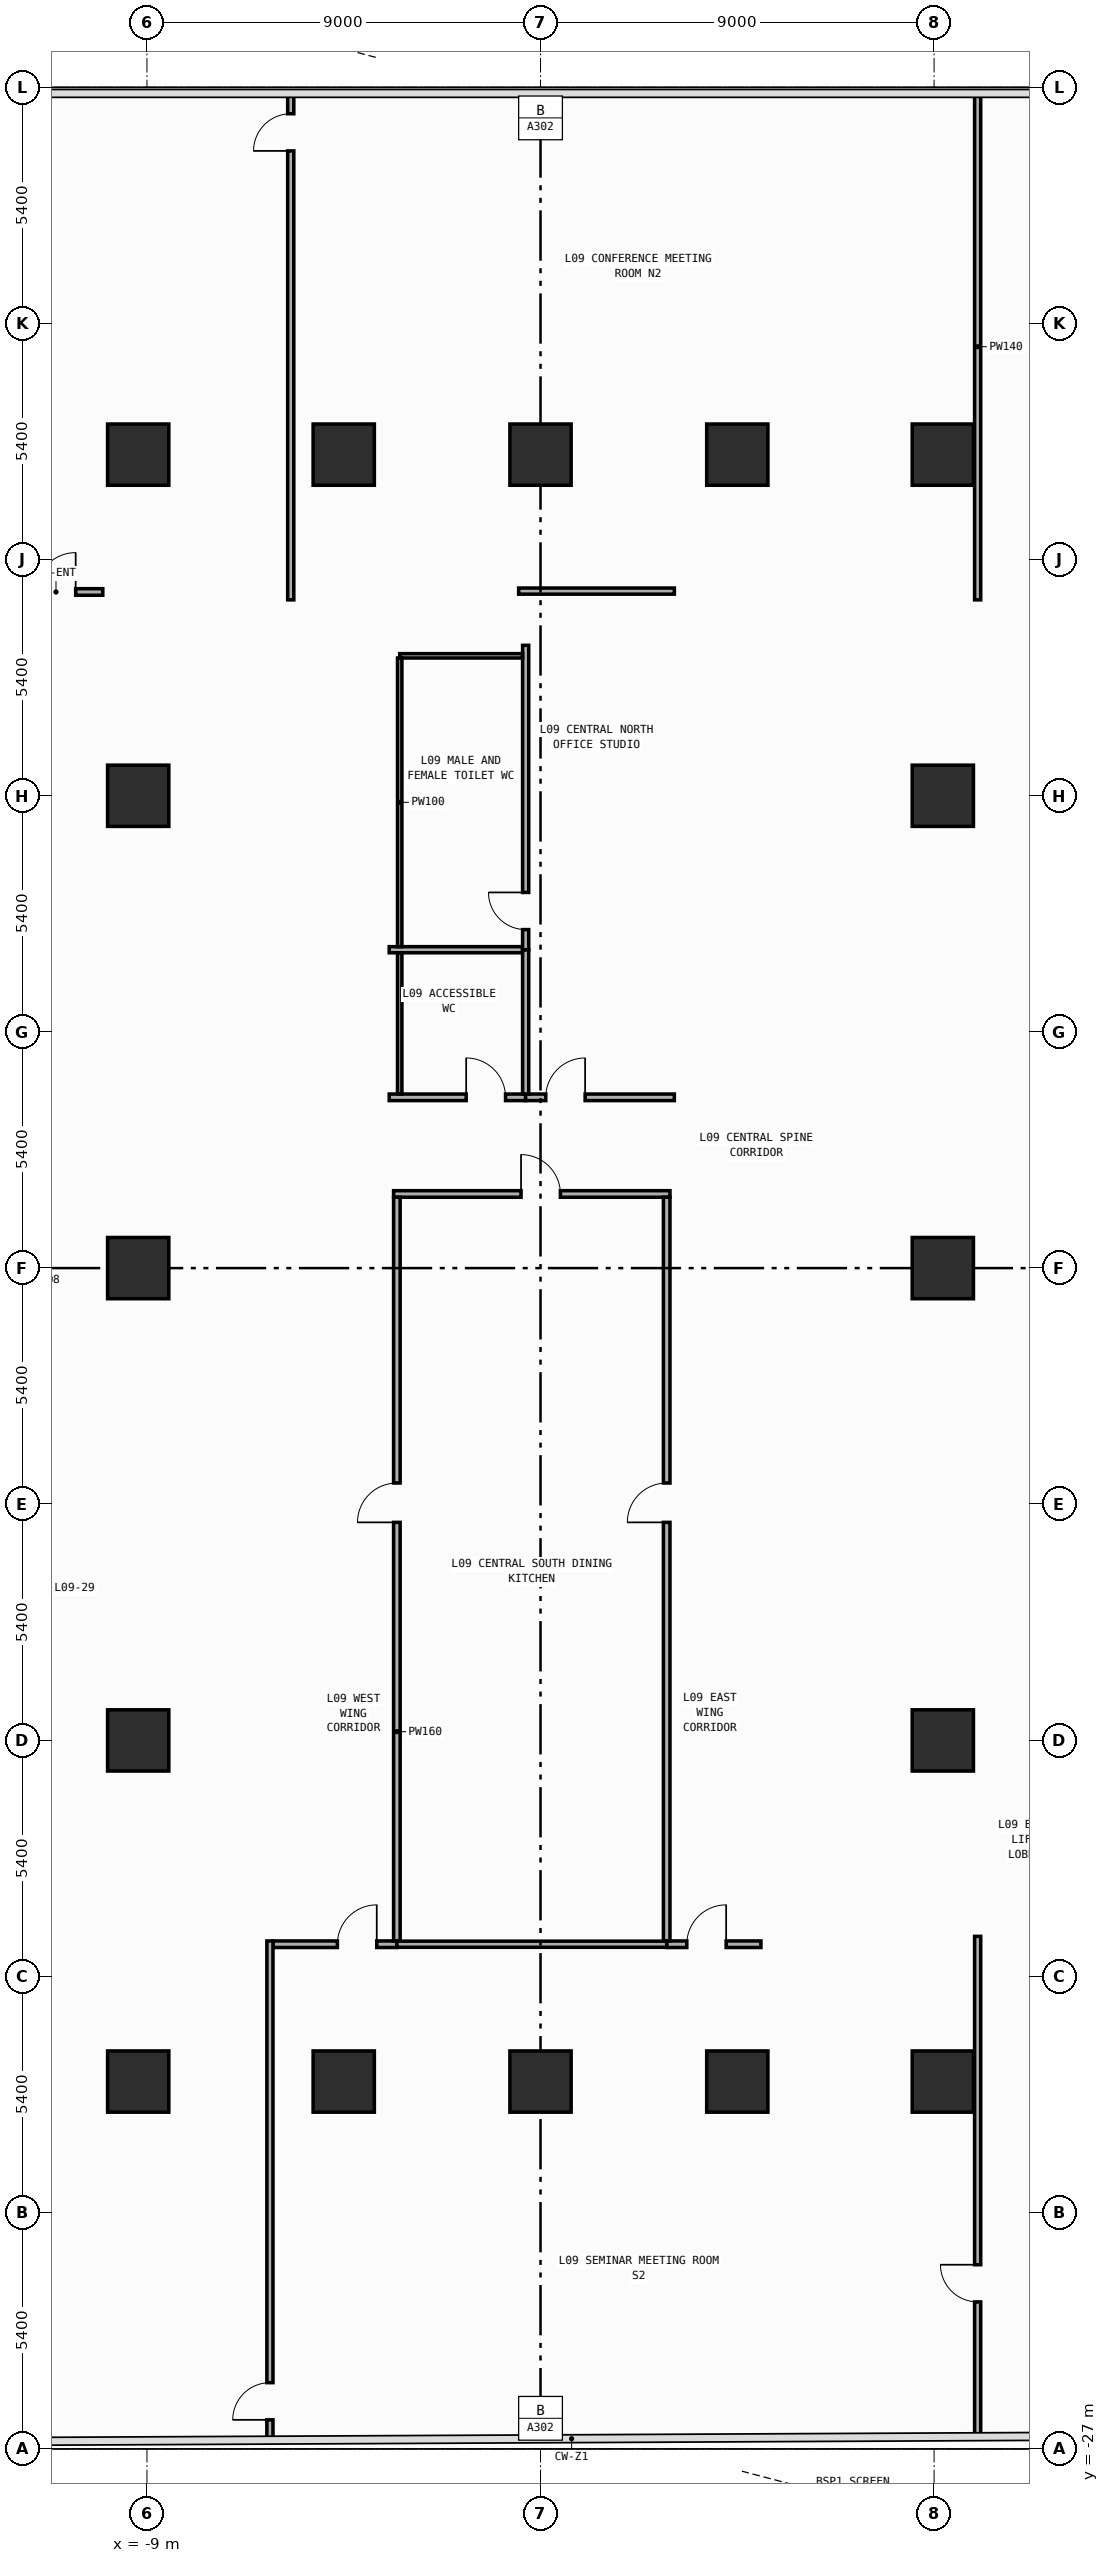
"""IFC4 building model, lengths in metres.
Left out: names, types, materials, properties, quantities, classifications, styles, units other than length and angle.
Written with IfcOpenShell. Run it as: python <this file> out.ifc"""

import sys

from ifc_helpers import new_model, si_unit, direction, frame, frame_2d, origin, origin_2d, place, context, subcontext, project, spatial, rectangle, extrude, element, fill, save


model = new_model("IFC4")
c1 = context("Model", 3, precision=1e-05, world=origin(), true_north=direction((0.0, 1.0)))
c2 = subcontext(c1, "Body", "Model", "MODEL_VIEW")
j1 = project(units=[si_unit("LENGTHUNIT", "METRE"), si_unit("PLANEANGLEUNIT", "RADIAN")], contexts=[c1])
p1 = place(None, origin())
s1 = spatial("IfcSite", under=j1, at=p1, CompositionType="ELEMENT")
p2 = place(p1, origin())
s2 = spatial("IfcBuilding", under=s1, at=p2, CompositionType="ELEMENT")
p3 = place(p2, frame((0.0, 0.0, 38.6)))
s3 = spatial("IfcBuildingStorey", under=s2, at=p3, CompositionType="ELEMENT", Elevation=38.6)
for number, where, z_axis, x_axis in (
    (1, (-9.2, -18.6, 0.0), (0.0, 0.0, 1.0), (1.0, 0.0, 0.0)),
    (2, (-9.2, -10.8, 0.0), (0.0, 0.0, 1.0), (1.0, 0.0, 0.0)),
    (3, (-9.2, 0.0, 0.0), (0.0, 0.0, 1.0), (1.0, 0.0, 0.0)),
    (4, (-9.2, 10.8, 0.0), (0.0, 0.0, 1.0), (1.0, 0.0, 0.0)),
    (5, (-9.2, 18.6, 0.0), (0.0, 0.0, 1.0), (1.0, 0.0, 0.0)),
    (6, (9.2, -18.6, 0.0), (0.0, 0.0, 1.0), (1.0, 0.0, 0.0)),
    (7, (9.2, -10.8, 0.0), (0.0, 0.0, 1.0), (1.0, 0.0, 0.0)),
    (8, (9.2, 0.0, 0.0), (0.0, 0.0, 1.0), (1.0, 0.0, 0.0)),
    (9, (9.2, 10.8, 0.0), (0.0, 0.0, 1.0), (1.0, 0.0, 0.0)),
    (10, (9.2, 18.6, 0.0), (0.0, 0.0, 1.0), (1.0, 0.0, 0.0)),
    (11, (-4.5, -18.6, 0.0), (0.0, 0.0, 1.0), (1.0, 0.0, 0.0)),
    (12, (0.0, -18.6, 0.0), (0.0, 0.0, 1.0), (1.0, 0.0, 0.0)),
    (13, (4.5, -18.6, 0.0), (0.0, 0.0, 1.0), (1.0, 0.0, 0.0)),
    (14, (-4.5, 18.6, 0.0), (0.0, 0.0, 1.0), (1.0, 0.0, 0.0)),
    (15, (0.0, 18.6, 0.0), (0.0, 0.0, 1.0), (1.0, 0.0, 0.0)),
    (16, (4.5, 18.6, 0.0), (0.0, 0.0, 1.0), (1.0, 0.0, 0.0)),
):
    element("IfcColumn", number, at=place(p3, frame(where, z_axis=z_axis, x_axis=x_axis)), inside=s3, PredefinedType="COLUMN", context=c2, shape_type="SweptSolid", body=[
        extrude(rectangle(XDim=1.4, YDim=1.4, at=origin_2d()), origin(), (0.0, 0.0, 1.0), 4.2),
    ])
p4 = place(p3, frame((-11.99, 15.46, 0.0), z_axis=(0.0, 0.0, 1.0), x_axis=(1.0, 0.0, 0.0)))
e17 = element("IfcWall", 17, at=p4, inside=s3, PredefinedType="PARTITIONING", context=c2, shape_type="SweptSolid", body=[
    extrude(rectangle(XDim=1.98, YDim=0.15, at=frame_2d((0.99, 0.0))), origin(), (0.0, 0.0, 1.0), 3.94),
])
p5 = place(p4, frame((0.46, 0.0, 0.0)))
e18 = element("IfcOpeningElement", 18, at=p5, cuts=e17, PredefinedType="OPENING", context=c2, shape_type="SweptSolid", body=[
    extrude(rectangle(XDim=0.9, YDim=2.15, at=frame_2d((0.45, 1.075))), frame((0.0, 0.085, 0.0), z_axis=(0.0, -1.0, 0.0), x_axis=(1.0, 0.0, 0.0)), (0.0, 0.0, 1.0), 0.17),
])
p6 = place(p3, frame((-3.46, 3.905, 0.0), z_axis=(0.0, 0.0, 1.0), x_axis=(1.0, 0.0, 0.0)))
e19 = element("IfcWall", 19, at=p6, inside=s3, PredefinedType="PARTITIONING", context=c2, shape_type="SweptSolid", body=[
    extrude(rectangle(XDim=3.12, YDim=0.15, at=frame_2d((1.56, 0.0))), origin(), (0.0, 0.0, 1.0), 3.94),
])
p7 = place(p6, frame((1.76, 0.0, 0.0)))
e20 = element("IfcOpeningElement", 20, at=p7, cuts=e19, PredefinedType="OPENING", context=c2, shape_type="SweptSolid", body=[
    extrude(rectangle(XDim=0.9, YDim=2.15, at=frame_2d((0.45, 1.075))), frame((0.0, 0.085, 0.0), z_axis=(0.0, -1.0, 0.0), x_axis=(1.0, 0.0, 0.0)), (0.0, 0.0, 1.0), 0.17),
])
p8 = place(p3, frame((-0.34, 3.905, 0.0), z_axis=(0.0, 0.0, 1.0), x_axis=(1.0, 0.0, 0.0)))
e21 = element("IfcWall", 21, at=p8, inside=s3, PredefinedType="PARTITIONING", context=c2, shape_type="SweptSolid", body=[
    extrude(rectangle(XDim=3.4, YDim=0.15, at=frame_2d((1.7, 0.0))), origin(), (0.0, 0.0, 1.0), 3.94),
])
p9 = place(p8, frame((0.46, 0.0, 0.0)))
e22 = element("IfcOpeningElement", 22, at=p9, cuts=e21, PredefinedType="OPENING", context=c2, shape_type="SweptSolid", body=[
    extrude(rectangle(XDim=0.9, YDim=2.15, at=frame_2d((0.45, 1.075))), frame((0.0, 0.085, 0.0), z_axis=(0.0, -1.0, 0.0), x_axis=(1.0, 0.0, 0.0)), (0.0, 0.0, 1.0), 0.17),
])
p10 = place(p3, frame((-3.36, 1.695, 0.0), z_axis=(0.0, 0.0, 1.0), x_axis=(1.0, 0.0, 0.0)))
e23 = element("IfcWall", 23, at=p10, inside=s3, PredefinedType="PARTITIONING", context=c2, shape_type="SweptSolid", body=[
    extrude(rectangle(XDim=6.32, YDim=0.15, at=frame_2d((3.16, 0.0))), origin(), (0.0, 0.0, 1.0), 3.94),
])
p11 = place(p10, frame((2.915, 0.0, 0.0)))
e24 = element("IfcOpeningElement", 24, at=p11, cuts=e23, PredefinedType="OPENING", context=c2, shape_type="SweptSolid", body=[
    extrude(rectangle(XDim=0.9, YDim=2.15, at=frame_2d((0.45, 1.075))), frame((0.0, 0.085, 0.0), z_axis=(0.0, -1.0, 0.0), x_axis=(1.0, 0.0, 0.0)), (0.0, 0.0, 1.0), 0.17),
])
p12 = place(p3, frame((-6.118, -15.46, 0.0), z_axis=(0.0, 0.0, 1.0), x_axis=(1.0, 0.0, 0.0)))
e25 = element("IfcWall", 25, at=p12, inside=s3, PredefinedType="PARTITIONING", context=c2, shape_type="SweptSolid", body=[
    extrude(rectangle(XDim=2.833, YDim=0.15, at=frame_2d((1.417, 0.0))), origin(), (0.0, 0.0, 1.0), 3.94),
])
p13 = place(p12, frame((1.473, 0.0, 0.0)))
e26 = element("IfcOpeningElement", 26, at=p13, cuts=e25, PredefinedType="OPENING", context=c2, shape_type="SweptSolid", body=[
    extrude(rectangle(XDim=0.9, YDim=2.15, at=frame_2d((0.45, 1.075))), frame((0.0, 0.085, 0.0), z_axis=(0.0, -1.0, 0.0), x_axis=(1.0, 0.0, 0.0)), (0.0, 0.0, 1.0), 0.17),
])
p14 = place(p3, frame((-3.285, -15.385, 0.0), z_axis=(0.0, 0.0, 1.0), x_axis=(0.0, 1.0, 0.0)))
e27 = element("IfcWall", 27, at=p14, inside=s3, PredefinedType="PARTITIONING", context=c2, shape_type="SweptSolid", body=[
    extrude(rectangle(XDim=17.005, YDim=0.15, at=frame_2d((8.502, 0.0))), origin(), (0.0, 0.0, 1.0), 3.94),
])
p15 = place(p14, frame((9.571, 0.0, 0.0)))
e28 = element("IfcOpeningElement", 28, at=p15, cuts=e27, PredefinedType="OPENING", context=c2, shape_type="SweptSolid", body=[
    extrude(rectangle(XDim=0.9, YDim=2.15, at=frame_2d((0.45, 1.075))), frame((0.0, 0.085, 0.0), z_axis=(0.0, -1.0, 0.0), x_axis=(1.0, 0.0, 0.0)), (0.0, 0.0, 1.0), 0.17),
])
p16 = place(p3, frame((2.885, -15.46, 0.0), z_axis=(0.0, 0.0, 1.0), x_axis=(1.0, 0.0, 0.0)))
e29 = element("IfcWall", 29, at=p16, inside=s3, PredefinedType="PARTITIONING", context=c2, shape_type="SweptSolid", body=[
    extrude(rectangle(XDim=2.155, YDim=0.15, at=frame_2d((1.078, 0.0))), origin(), (0.0, 0.0, 1.0), 3.94),
])
p17 = place(p16, frame((0.46, 0.0, 0.0)))
e30 = element("IfcOpeningElement", 30, at=p17, cuts=e29, PredefinedType="OPENING", context=c2, shape_type="SweptSolid", body=[
    extrude(rectangle(XDim=0.9, YDim=2.15, at=frame_2d((0.45, 1.075))), frame((0.0, 0.085, 0.0), z_axis=(0.0, -1.0, 0.0), x_axis=(1.0, 0.0, 0.0)), (0.0, 0.0, 1.0), 0.17),
])
p18 = place(p3, frame((2.885, -15.385, 0.0), z_axis=(0.0, 0.0, 1.0), x_axis=(0.0, 1.0, 0.0)))
e31 = element("IfcWall", 31, at=p18, inside=s3, PredefinedType="PARTITIONING", context=c2, shape_type="SweptSolid", body=[
    extrude(rectangle(XDim=17.005, YDim=0.15, at=frame_2d((8.502, 0.0))), origin(), (0.0, 0.0, 1.0), 3.94),
])
p19 = place(p18, frame((9.571, 0.0, 0.0)))
e32 = element("IfcOpeningElement", 32, at=p19, cuts=e31, PredefinedType="OPENING", context=c2, shape_type="SweptSolid", body=[
    extrude(rectangle(XDim=0.9, YDim=2.15, at=frame_2d((0.45, 1.075))), frame((0.0, 0.085, 0.0), z_axis=(0.0, -1.0, 0.0), x_axis=(1.0, 0.0, 0.0)), (0.0, 0.0, 1.0), 0.17),
])
p20 = place(p3, frame((-5.712, 15.28, 0.0), z_axis=(0.0, 0.0, 1.0), x_axis=(0.0, 1.0, 0.0)))
e33 = element("IfcWall", 33, at=p20, inside=s3, PredefinedType="PARTITIONING", context=c2, shape_type="SweptSolid", body=[
    extrude(rectangle(XDim=11.575, YDim=0.14, at=frame_2d((5.788, 0.0))), origin(), (0.0, 0.0, 1.0), 3.94),
])
p21 = place(p20, frame((10.265, 0.0, 0.0)))
e34 = element("IfcOpeningElement", 34, at=p21, cuts=e33, PredefinedType="OPENING", context=c2, shape_type="SweptSolid", body=[
    extrude(rectangle(XDim=0.85, YDim=2.1, at=frame_2d((0.425, 1.05))), frame((0.0, 0.08, 0.0), z_axis=(0.0, -1.0, 0.0), x_axis=(1.0, 0.0, 0.0)), (0.0, 0.0, 1.0), 0.16),
])
p22 = place(p3, frame((9.996, 15.28, 0.0), z_axis=(0.0, 0.0, 1.0), x_axis=(0.0, 1.0, 0.0)))
e35 = element("IfcWall", 35, at=p22, inside=s3, PredefinedType="PARTITIONING", context=c2, shape_type="SweptSolid", body=[
    extrude(rectangle(XDim=11.575, YDim=0.14, at=frame_2d((5.788, 0.0))), origin(), (0.0, 0.0, 1.0), 3.94),
])
p23 = place(p3, frame((-0.5, 15.48, 0.0), z_axis=(0.0, 0.0, 1.0), x_axis=(1.0, 0.0, 0.0)))
e36 = element("IfcWall", 36, at=p23, inside=s3, PredefinedType="PARTITIONING", context=c2, shape_type="SweptSolid", body=[
    extrude(rectangle(XDim=3.56, YDim=0.14, at=frame_2d((1.78, 0.0))), origin(), (0.0, 0.0, 1.0), 3.94),
])
p24 = place(p3, frame((-6.188, -26.795, 0.0), z_axis=(0.0, 0.0, 1.0), x_axis=(0.0, 1.0, 0.0)))
e37 = element("IfcWall", 37, at=p24, inside=s3, PredefinedType="PARTITIONING", context=c2, shape_type="SweptSolid", body=[
    extrude(rectangle(XDim=11.41, YDim=0.14, at=frame_2d((5.705, 0.0))), origin(), (0.0, 0.0, 1.0), 3.94),
])
p25 = place(p24, frame((0.46, 0.0, 0.0)))
e38 = element("IfcOpeningElement", 38, at=p25, cuts=e37, PredefinedType="OPENING", context=c2, shape_type="SweptSolid", body=[
    extrude(rectangle(XDim=0.85, YDim=2.1, at=frame_2d((0.425, 1.05))), frame((0.0, 0.08, 0.0), z_axis=(0.0, -1.0, 0.0), x_axis=(1.0, 0.0, 0.0)), (0.0, 0.0, 1.0), 0.16),
])
p26 = place(p3, frame((9.996, -26.716, 0.0), z_axis=(0.0, 0.0, 1.0), x_axis=(0.0, 1.0, 0.0)))
e39 = element("IfcWall", 39, at=p26, inside=s3, PredefinedType="PARTITIONING", context=c2, shape_type="SweptSolid", body=[
    extrude(rectangle(XDim=11.436, YDim=0.14, at=frame_2d((5.718, 0.0))), origin(), (0.0, 0.0, 1.0), 3.94),
])
p27 = place(p26, frame((3.078, 0.0, 0.0)))
e40 = element("IfcOpeningElement", 40, at=p27, cuts=e39, PredefinedType="OPENING", context=c2, shape_type="SweptSolid", body=[
    extrude(rectangle(XDim=0.85, YDim=2.1, at=frame_2d((0.425, 1.05))), frame((0.0, 0.08, 0.0), z_axis=(0.0, -1.0, 0.0), x_axis=(1.0, 0.0, 0.0)), (0.0, 0.0, 1.0), 0.16),
])
p28 = place(p3, frame((-3.285, -15.46, 0.0), z_axis=(0.0, 0.0, 1.0), x_axis=(1.0, 0.0, 0.0)))
e41 = element("IfcWall", 41, at=p28, inside=s3, PredefinedType="PARTITIONING", context=c2, shape_type="SweptSolid", body=[
    extrude(rectangle(XDim=6.17, YDim=0.14, at=frame_2d((3.085, 0.0))), origin(), (0.0, 0.0, 1.0), 3.94),
])
p29 = place(p3, frame((-3.46, 7.28, 0.0), z_axis=(0.0, 0.0, 1.0), x_axis=(1.0, 0.0, 0.0)))
e42 = element("IfcWall", 42, at=p29, inside=s3, PredefinedType="PARTITIONING", context=c2, shape_type="SweptSolid", body=[
    extrude(rectangle(XDim=3.05, YDim=0.14, at=frame_2d((1.525, 0.0))), origin(), (0.0, 0.0, 1.0), 3.94),
])
p30 = place(p3, frame((-0.34, 3.98, 0.0), z_axis=(0.0, 0.0, 1.0), x_axis=(0.0, 1.0, 0.0)))
e43 = element("IfcWall", 43, at=p30, inside=s3, PredefinedType="PARTITIONING", context=c2, shape_type="SweptSolid", body=[
    extrude(rectangle(XDim=3.3, YDim=0.14, at=frame_2d((1.65, 0.0))), origin(), (0.0, 0.0, 1.0), 3.94),
])
p31 = place(p3, frame((-0.34, 7.28, 0.0), z_axis=(0.0, 0.0, 1.0), x_axis=(0.0, 1.0, 0.0)))
e44 = element("IfcWall", 44, at=p31, inside=s3, PredefinedType="PARTITIONING", context=c2, shape_type="SweptSolid", body=[
    extrude(rectangle(XDim=6.96, YDim=0.14, at=frame_2d((3.48, 0.0))), origin(), (0.0, 0.0, 1.0), 3.94),
])
p32 = place(p31, frame((0.46, 0.0, 0.0)))
e45 = element("IfcOpeningElement", 45, at=p32, cuts=e44, PredefinedType="OPENING", context=c2, shape_type="SweptSolid", body=[
    extrude(rectangle(XDim=0.85, YDim=2.1, at=frame_2d((0.425, 1.05))), frame((0.0, 0.08, 0.0), z_axis=(0.0, -1.0, 0.0), x_axis=(1.0, 0.0, 0.0)), (0.0, 0.0, 1.0), 0.16),
])
p33 = place(p3, frame((-3.22, 3.98, 0.0), z_axis=(0.0, 0.0, 1.0), x_axis=(0.0, 1.0, 0.0)))
e46 = element("IfcWall", 46, at=p33, inside=s3, PredefinedType="PARTITIONING", context=c2, shape_type="SweptSolid", body=[
    extrude(rectangle(XDim=3.23, YDim=0.1, at=frame_2d((1.615, 0.0))), origin(), (0.0, 0.0, 1.0), 3.94),
])
p34 = place(p3, frame((-3.22, 14.0, 0.0), z_axis=(0.0, 0.0, 1.0), x_axis=(1.0, 0.0, 0.0)))
e47 = element("IfcWall", 47, at=p34, inside=s3, PredefinedType="PARTITIONING", context=c2, shape_type="SweptSolid", body=[
    extrude(rectangle(XDim=2.81, YDim=0.1, at=frame_2d((1.405, 0.0))), origin(), (0.0, 0.0, 1.0), 3.94),
])
p35 = place(p3, frame((-3.22, 7.35, 0.0), z_axis=(0.0, 0.0, 1.0), x_axis=(0.0, 1.0, 0.0)))
e48 = element("IfcWall", 48, at=p35, inside=s3, PredefinedType="PARTITIONING", context=c2, shape_type="SweptSolid", body=[
    extrude(rectangle(XDim=6.6, YDim=0.1, at=frame_2d((3.3, 0.0))), origin(), (0.0, 0.0, 1.0), 3.94),
])
p36 = place(p5, origin())
e49 = element("IfcDoor", 49, at=p36, inside=s3, OperationType="SINGLE_SWING_RIGHT", PredefinedType="DOOR", context=c2, shape_type="SweptSolid", body=[
    extrude(rectangle(XDim=0.9, YDim=2.15, at=frame_2d((0.45, 1.075))), frame((0.0, 0.025, 0.0), z_axis=(0.0, -1.0, 0.0), x_axis=(1.0, 0.0, 0.0)), (0.0, 0.0, 1.0), 0.05),
])
fill(e18, e49)
p37 = place(p7, origin())
e50 = element("IfcDoor", 50, at=p37, inside=s3, OperationType="SINGLE_SWING_LEFT", PredefinedType="DOOR", context=c2, shape_type="SweptSolid", body=[
    extrude(rectangle(XDim=0.9, YDim=2.15, at=frame_2d((0.45, 1.075))), frame((0.0, 0.025, 0.0), z_axis=(0.0, -1.0, 0.0), x_axis=(1.0, 0.0, 0.0)), (0.0, 0.0, 1.0), 0.05),
])
fill(e20, e50)
p38 = place(p9, origin())
e51 = element("IfcDoor", 51, at=p38, inside=s3, OperationType="SINGLE_SWING_RIGHT", PredefinedType="DOOR", context=c2, shape_type="SweptSolid", body=[
    extrude(rectangle(XDim=0.9, YDim=2.15, at=frame_2d((0.45, 1.075))), frame((0.0, 0.025, 0.0), z_axis=(0.0, -1.0, 0.0), x_axis=(1.0, 0.0, 0.0)), (0.0, 0.0, 1.0), 0.05),
])
fill(e22, e51)
p39 = place(p11, origin())
e52 = element("IfcDoor", 52, at=p39, inside=s3, OperationType="SINGLE_SWING_LEFT", PredefinedType="DOOR", context=c2, shape_type="SweptSolid", body=[
    extrude(rectangle(XDim=0.9, YDim=2.15, at=frame_2d((0.45, 1.075))), frame((0.0, 0.025, 0.0), z_axis=(0.0, -1.0, 0.0), x_axis=(1.0, 0.0, 0.0)), (0.0, 0.0, 1.0), 0.05),
])
fill(e24, e52)
p40 = place(p13, origin())
e53 = element("IfcDoor", 53, at=p40, inside=s3, OperationType="SINGLE_SWING_RIGHT", PredefinedType="DOOR", context=c2, shape_type="SweptSolid", body=[
    extrude(rectangle(XDim=0.9, YDim=2.15, at=frame_2d((0.45, 1.075))), frame((0.0, 0.025, 0.0), z_axis=(0.0, -1.0, 0.0), x_axis=(1.0, 0.0, 0.0)), (0.0, 0.0, 1.0), 0.05),
])
fill(e26, e53)
p41 = place(p15, origin())
e54 = element("IfcDoor", 54, at=p41, inside=s3, OperationType="SINGLE_SWING_LEFT", PredefinedType="DOOR", context=c2, shape_type="SweptSolid", body=[
    extrude(rectangle(XDim=0.9, YDim=2.15, at=frame_2d((0.45, 1.075))), frame((0.0, 0.025, 0.0), z_axis=(0.0, -1.0, 0.0), x_axis=(1.0, 0.0, 0.0)), (0.0, 0.0, 1.0), 0.05),
])
fill(e28, e54)
p42 = place(p17, origin())
e55 = element("IfcDoor", 55, at=p42, inside=s3, OperationType="SINGLE_SWING_RIGHT", PredefinedType="DOOR", context=c2, shape_type="SweptSolid", body=[
    extrude(rectangle(XDim=0.9, YDim=2.15, at=frame_2d((0.45, 1.075))), frame((0.0, 0.025, 0.0), z_axis=(0.0, -1.0, 0.0), x_axis=(1.0, 0.0, 0.0)), (0.0, 0.0, 1.0), 0.05),
])
fill(e30, e55)
p43 = place(p19, origin())
e56 = element("IfcDoor", 56, at=p43, inside=s3, OperationType="SINGLE_SWING_LEFT", PredefinedType="DOOR", context=c2, shape_type="SweptSolid", body=[
    extrude(rectangle(XDim=0.9, YDim=2.15, at=frame_2d((0.45, 1.075))), frame((0.0, 0.025, 0.0), z_axis=(0.0, -1.0, 0.0), x_axis=(1.0, 0.0, 0.0)), (0.0, 0.0, 1.0), 0.05),
])
fill(e32, e56)
p44 = place(p21, origin())
e57 = element("IfcDoor", 57, at=p44, inside=s3, OperationType="SINGLE_SWING_LEFT", PredefinedType="DOOR", context=c2, shape_type="SweptSolid", body=[
    extrude(rectangle(XDim=0.85, YDim=2.1, at=frame_2d((0.425, 1.05))), frame((0.0, 0.025, 0.0), z_axis=(0.0, -1.0, 0.0), x_axis=(1.0, 0.0, 0.0)), (0.0, 0.0, 1.0), 0.05),
])
fill(e34, e57)
p45 = place(p27, origin())
e58 = element("IfcDoor", 58, at=p45, inside=s3, OperationType="SINGLE_SWING_RIGHT", PredefinedType="DOOR", context=c2, shape_type="SweptSolid", body=[
    extrude(rectangle(XDim=0.85, YDim=2.1, at=frame_2d((0.425, 1.05))), frame((0.0, 0.025, 0.0), z_axis=(0.0, -1.0, 0.0), x_axis=(1.0, 0.0, 0.0)), (0.0, 0.0, 1.0), 0.05),
])
fill(e40, e58)
p46 = place(p25, origin())
e59 = element("IfcDoor", 59, at=p46, inside=s3, OperationType="SINGLE_SWING_LEFT", PredefinedType="DOOR", context=c2, shape_type="SweptSolid", body=[
    extrude(rectangle(XDim=0.85, YDim=2.1, at=frame_2d((0.425, 1.05))), frame((0.0, 0.025, 0.0), z_axis=(0.0, -1.0, 0.0), x_axis=(1.0, 0.0, 0.0)), (0.0, 0.0, 1.0), 0.05),
])
fill(e38, e59)
p47 = place(p32, origin())
e60 = element("IfcDoor", 60, at=p47, inside=s3, OperationType="SINGLE_SWING_RIGHT", PredefinedType="DOOR", context=c2, shape_type="SweptSolid", body=[
    extrude(rectangle(XDim=0.85, YDim=2.1, at=frame_2d((0.425, 1.05))), frame((0.0, 0.025, 0.0), z_axis=(0.0, -1.0, 0.0), x_axis=(1.0, 0.0, 0.0)), (0.0, 0.0, 1.0), 0.05),
])
fill(e45, e60)
save(model, sys.argv[1])
